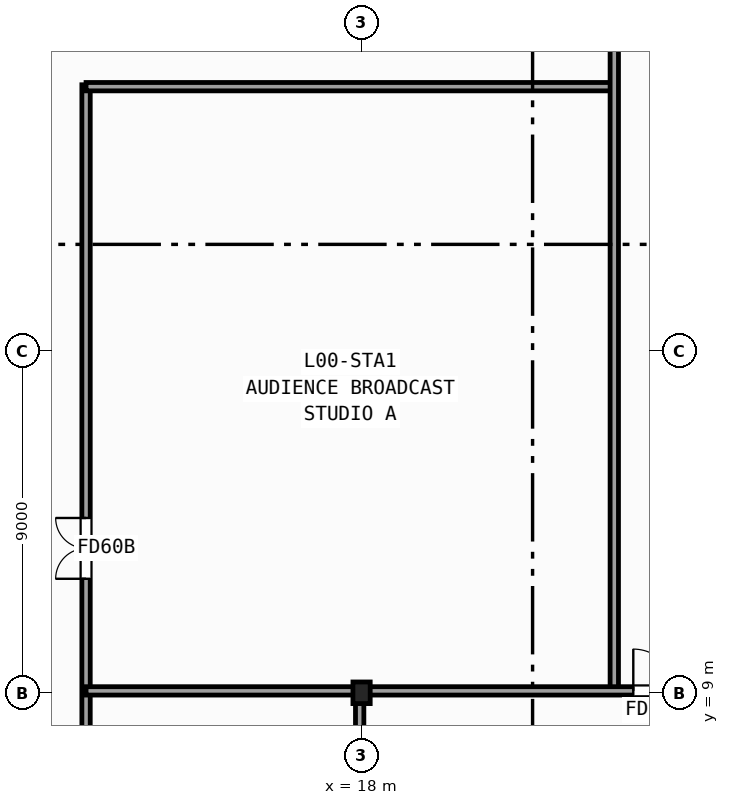
"""IFC4 building model, lengths in metres.
Left out: names, types, materials, properties, quantities, classifications, styles, units other than length and angle.
Written with IfcOpenShell. Run it as: python <this file> out.ifc"""

import sys

from ifc_helpers import new_model, si_unit, direction, frame, frame_2d, origin, origin_2d, place, context, subcontext, project, spatial, rectangle, i_section, extrude, element, fill, save


model = new_model("IFC4")
c1 = context("Model", 3, precision=1e-05, world=origin(), true_north=direction((0.0, 1.0)))
c2 = subcontext(c1, "Body", "Model", "MODEL_VIEW")
j1 = project(units=[si_unit("LENGTHUNIT", "METRE"), si_unit("PLANEANGLEUNIT", "RADIAN")], contexts=[c1])
p1 = place(None, origin())
s1 = spatial("IfcSite", under=j1, at=p1, CompositionType="ELEMENT")
p2 = place(p1, origin())
s2 = spatial("IfcBuilding", under=s1, at=p2, CompositionType="ELEMENT")
p3 = place(p2, origin())
s3 = spatial("IfcBuildingStorey", under=s2, at=p3, CompositionType="ELEMENT", Elevation=0.0)
p4 = place(p3, frame((18.0, 9.0, 0.0), z_axis=(0.0, 0.0, 1.0), x_axis=(1.0, 0.0, 0.0)))
e1 = element("IfcColumn", 1, at=p4, inside=s3, PredefinedType="COLUMN", context=c2, shape_type="SweptSolid", body=[
    extrude(i_section(OverallWidth=0.454, OverallDepth=0.569, WebThickness=0.078, FlangeThickness=0.125, FilletRadius=0.015, at=origin_2d()), origin(), (0.0, 0.0, 1.0), 5.8),
])
p5 = place(p3, frame((10.75, 0.0, 0.0), z_axis=(0.0, 0.0, 1.0), x_axis=(0.0, 1.0, 0.0)))
e2 = element("IfcWall", 2, at=p5, inside=s3, PredefinedType="PARTITIONING", context=c2, shape_type="SweptSolid", body=[
    extrude(rectangle(XDim=25.0, YDim=0.22, at=frame_2d((12.5, 0.0))), origin(), (0.0, 0.0, 1.0), 4.512),
])
p6 = place(p5, frame((12.0, 0.0, 0.0)))
e3 = element("IfcOpeningElement", 3, at=p6, cuts=e2, PredefinedType="OPENING", context=c2, shape_type="SweptSolid", body=[
    extrude(rectangle(XDim=1.6, YDim=2.2, at=frame_2d((0.8, 1.1))), frame((0.0, 0.12, 0.0), z_axis=(0.0, -1.0, 0.0), x_axis=(1.0, 0.0, 0.0)), (0.0, 0.0, 1.0), 0.24),
])
p7 = place(p5, frame((3.5, 0.0, 0.0)))
e4 = element("IfcOpeningElement", 4, at=p7, cuts=e2, PredefinedType="OPENING", context=c2, shape_type="SweptSolid", body=[
    extrude(rectangle(XDim=1.2, YDim=2.15, at=frame_2d((0.6, 1.075))), frame((0.0, 0.12, 0.0), z_axis=(0.0, -1.0, 0.0), x_axis=(1.0, 0.0, 0.0)), (0.0, 0.0, 1.0), 0.24),
])
p8 = place(p3, frame((10.75, 24.95, 0.0), z_axis=(0.0, 0.0, 1.0), x_axis=(1.0, 0.0, 0.0)))
e5 = element("IfcWall", 5, at=p8, inside=s3, PredefinedType="PARTITIONING", context=c2, shape_type="SweptSolid", body=[
    extrude(rectangle(XDim=13.9, YDim=0.22, at=frame_2d((6.95, 0.0))), origin(), (0.0, 0.0, 1.0), 5.48),
])
p9 = place(p3, frame((24.65, 9.05, 0.0), z_axis=(0.0, 0.0, 1.0), x_axis=(0.0, 1.0, 0.0)))
e6 = element("IfcWall", 6, at=p9, inside=s3, PredefinedType="PARTITIONING", context=c2, shape_type="SweptSolid", body=[
    extrude(rectangle(XDim=19.15, YDim=0.22, at=frame_2d((9.575, 0.0))), origin(), (0.0, 0.0, 1.0), 4.512),
])
p10 = place(p3, frame((10.75, 9.05, 0.0), z_axis=(0.0, 0.0, 1.0), x_axis=(1.0, 0.0, 0.0)))
e7 = element("IfcWall", 7, at=p10, inside=s3, PredefinedType="PARTITIONING", context=c2, shape_type="SweptSolid", body=[
    extrude(rectangle(XDim=18.65, YDim=0.22, at=frame_2d((9.325, 0.0))), origin(), (0.0, 0.0, 1.0), 4.533),
])
p11 = place(p10, frame((14.4, 0.0, 0.0)))
e8 = element("IfcOpeningElement", 8, at=p11, cuts=e7, PredefinedType="OPENING", context=c2, shape_type="SweptSolid", body=[
    extrude(rectangle(XDim=1.1, YDim=2.15, at=frame_2d((0.55, 1.075))), frame((0.0, 0.12, 0.0), z_axis=(0.0, -1.0, 0.0), x_axis=(1.0, 0.0, 0.0)), (0.0, 0.0, 1.0), 0.24),
])
p12 = place(p3, frame((17.95, 0.0, 0.0), z_axis=(0.0, 0.0, 1.0), x_axis=(0.0, 1.0, 0.0)))
e9 = element("IfcWall", 9, at=p12, inside=s3, PredefinedType="PARTITIONING", context=c2, shape_type="SweptSolid", body=[
    extrude(rectangle(XDim=9.05, YDim=0.22, at=frame_2d((4.525, 0.0))), origin(), (0.0, 0.0, 1.0), 4.533),
])
p13 = place(p6, origin())
e10 = element("IfcDoor", 10, at=p13, inside=s3, OperationType="DOUBLE_DOOR_SINGLE_SWING", PredefinedType="DOOR", context=c2, shape_type="SweptSolid", body=[
    extrude(rectangle(XDim=1.6, YDim=2.2, at=frame_2d((0.8, 1.1))), frame((0.0, 0.025, 0.0), z_axis=(0.0, -1.0, 0.0), x_axis=(1.0, 0.0, 0.0)), (0.0, 0.0, 1.0), 0.05),
])
fill(e3, e10)
p14 = place(p11, origin())
e11 = element("IfcDoor", 11, at=p14, inside=s3, OperationType="SINGLE_SWING_LEFT", PredefinedType="DOOR", context=c2, shape_type="SweptSolid", body=[
    extrude(rectangle(XDim=1.1, YDim=2.15, at=frame_2d((0.55, 1.075))), frame((0.0, 0.025, 0.0), z_axis=(0.0, -1.0, 0.0), x_axis=(1.0, 0.0, 0.0)), (0.0, 0.0, 1.0), 0.05),
])
fill(e8, e11)
save(model, sys.argv[1])
